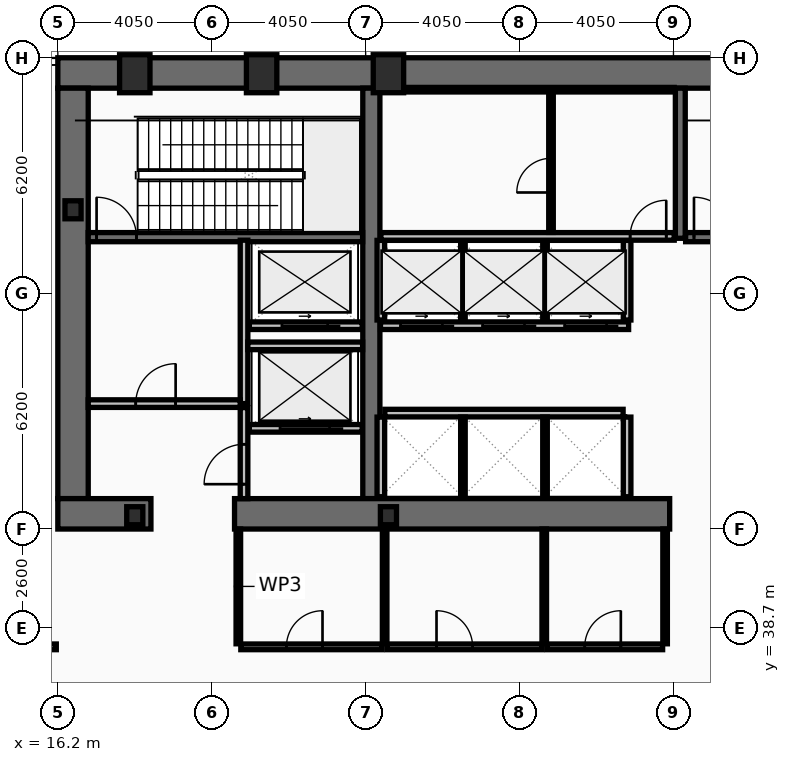
"""IFC4 building model, lengths in metres.
Left out: names, types, materials, properties, quantities, classifications, styles, units other than length and angle.
Written with IfcOpenShell. Run it as: python <this file> out.ifc"""

import sys

from ifc_helpers import new_model, si_unit, direction, frame, frame_2d, origin, origin_2d, place, context, subcontext, project, spatial, rectangle, hollow_rectangle, i_section, extrude, element, fill, save


model = new_model("IFC4")
c1 = context("Model", 3, precision=1e-05, world=origin(), true_north=direction((0.0, 1.0)))
c2 = subcontext(c1, "Body", "Model", "MODEL_VIEW")
j1 = project(units=[si_unit("LENGTHUNIT", "METRE"), si_unit("PLANEANGLEUNIT", "RADIAN")], contexts=[c1])
p1 = place(None, origin())
s1 = spatial("IfcSite", under=j1, at=p1, CompositionType="ELEMENT")
p2 = place(p1, origin())
s2 = spatial("IfcBuilding", under=s1, at=p2, CompositionType="ELEMENT")
p3 = place(p2, frame((0.0, 0.0, 20.4)))
s3 = spatial("IfcBuildingStorey", under=s2, at=p3, CompositionType="ELEMENT", Elevation=20.4)
p4 = place(p3, frame((16.2, 53.3, 0.0), z_axis=(0.0, 0.0, 1.0), x_axis=(1.0, 0.0, 0.0)))
e1 = element("IfcWall", 1, at=p4, inside=s3, PredefinedType="SHEAR", context=c2, shape_type="SweptSolid", body=[
    extrude(rectangle(XDim=40.5, YDim=0.8, at=frame_2d((20.25, 0.0))), origin(), (0.0, 0.0, 1.0), 5.22),
])
p5 = place(p3, frame((16.6, 42.1, 0.0), z_axis=(0.0, 0.0, 1.0), x_axis=(0.0, 1.0, 0.0)))
e2 = element("IfcWall", 2, at=p5, inside=s3, PredefinedType="SHEAR", context=c2, shape_type="SweptSolid", body=[
    extrude(rectangle(XDim=10.8, YDim=0.8, at=frame_2d((5.4, 0.0))), origin(), (0.0, 0.0, 1.0), 5.22),
])
p6 = place(p3, frame((24.45, 42.1, 0.0), z_axis=(0.0, 0.0, 1.0), x_axis=(0.0, 1.0, 0.0)))
e3 = element("IfcWall", 3, at=p6, inside=s3, PredefinedType="SHEAR", context=c2, shape_type="SweptSolid", body=[
    extrude(rectangle(XDim=10.8, YDim=0.45, at=frame_2d((5.4, 0.0))), origin(), (0.0, 0.0, 1.0), 5.22),
])
p7 = place(p3, frame((18.65, 41.7, 0.0), z_axis=(0.0, 0.0, 1.0), x_axis=(-1.0, 0.0, 0.0)))
e4 = element("IfcWall", 4, at=p7, inside=s3, PredefinedType="SHEAR", context=c2, shape_type="SweptSolid", body=[
    extrude(rectangle(XDim=2.45, YDim=0.8, at=frame_2d((1.225, 0.0))), origin(), (0.0, 0.0, 1.0), 5.22),
])
p8 = place(p3, frame((32.3, 41.7, 0.0), z_axis=(0.0, 0.0, 1.0), x_axis=(-1.0, 0.0, 0.0)))
e5 = element("IfcWall", 5, at=p8, inside=s3, PredefinedType="SHEAR", context=c2, shape_type="SweptSolid", body=[
    extrude(rectangle(XDim=11.45, YDim=0.8, at=frame_2d((5.725, 0.0))), origin(), (0.0, 0.0, 1.0), 5.22),
])
p9 = place(p3, frame((32.58, 48.95, 0.0), z_axis=(0.0, 0.0, 1.0), x_axis=(0.0, 1.0, 0.0)))
e6 = element("IfcWall", 6, at=p9, inside=s3, PredefinedType="SHEAR", context=c2, shape_type="SweptSolid", body=[
    extrude(rectangle(XDim=3.95, YDim=0.26, at=frame_2d((1.975, 0.0))), origin(), (0.0, 0.0, 1.0), 5.22),
])
p10 = place(p3, frame((17.0, 48.98, 0.0), z_axis=(0.0, 0.0, 1.0), x_axis=(1.0, 0.0, 0.0)))
e7 = element("IfcWall", 7, at=p10, inside=s3, PredefinedType="SHEAR", context=c2, shape_type="SweptSolid", body=[
    extrude(rectangle(XDim=7.22, YDim=0.24, at=frame_2d((3.61, 0.0))), origin(), (0.0, 0.0, 1.0), 5.22),
])
p11 = place(p10, frame((0.22, 0.0, 0.0)))
e8 = element("IfcOpeningElement", 8, at=p11, cuts=e7, PredefinedType="OPENING", context=c2, shape_type="SweptSolid", body=[
    extrude(rectangle(XDim=1.05, YDim=2.15, at=frame_2d((0.525, 1.075))), frame((0.0, 0.13, 0.0), z_axis=(0.0, -1.0, 0.0), x_axis=(1.0, 0.0, 0.0)), (0.0, 0.0, 1.0), 0.26),
])
p12 = place(p3, frame((32.72, 48.98, 0.0), z_axis=(0.0, 0.0, 1.0), x_axis=(1.0, 0.0, 0.0)))
e9 = element("IfcWall", 9, at=p12, inside=s3, PredefinedType="SHEAR", context=c2, shape_type="SweptSolid", body=[
    extrude(rectangle(XDim=7.56, YDim=0.24, at=frame_2d((3.78, 0.0))), origin(), (0.0, 0.0, 1.0), 5.22),
])
p13 = place(p12, frame((0.22, 0.0, 0.0)))
e10 = element("IfcOpeningElement", 10, at=p13, cuts=e9, PredefinedType="OPENING", context=c2, shape_type="SweptSolid", body=[
    extrude(rectangle(XDim=1.05, YDim=2.15, at=frame_2d((0.525, 1.075))), frame((0.0, 0.13, 0.0), z_axis=(0.0, -1.0, 0.0), x_axis=(1.0, 0.0, 0.0)), (0.0, 0.0, 1.0), 0.26),
])
for number, where, z_axis, x_axis in (
    (11, (18.225, 53.28, 0.0), (0.0, 0.0, 1.0), (1.0, 0.0, 0.0)),
    (12, (21.562, 53.28, 0.0), (0.0, 0.0, 1.0), (1.0, 0.0, 0.0)),
    (13, (24.9, 53.28, 0.0), (0.0, 0.0, 1.0), (1.0, 0.0, 0.0)),
):
    element("IfcColumn", number, at=place(p3, frame(where, z_axis=z_axis, x_axis=x_axis)), inside=s3, PredefinedType="COLUMN", context=c2, shape_type="SweptSolid", body=[
        extrude(hollow_rectangle(XDim=0.8, YDim=1.0, WallThickness=0.055, at=origin_2d()), origin(), (0.0, 0.0, 1.0), 5.4),
    ])
for number, where, z_axis, x_axis in (
    (14, (16.6, 49.7, 0.0), (0.0, 0.0, 1.0), (1.0, 0.0, 0.0)),
    (15, (18.225, 41.65, 0.0), (0.0, 0.0, 1.0), (1.0, 0.0, 0.0)),
    (16, (24.9, 41.65, 0.0), (0.0, 0.0, 1.0), (1.0, 0.0, 0.0)),
):
    element("IfcColumn", number, at=place(p3, frame(where, z_axis=z_axis, x_axis=x_axis)), inside=s3, PredefinedType="COLUMN", context=c2, shape_type="SweptSolid", body=[
        extrude(i_section(OverallWidth=0.424, OverallDepth=0.474, WebThickness=0.048, FlangeThickness=0.077, at=origin_2d()), origin(), (0.0, 0.0, 1.0), 5.4),
    ])
p14 = place(p3, frame((24.21, 43.95, 0.0), z_axis=(0.0, 0.0, 1.0), x_axis=(-1.0, 0.0, 0.0)))
e17 = element("IfcWall", 17, at=p14, inside=s3, PredefinedType="PARTITIONING", context=c2, shape_type="SweptSolid", body=[
    extrude(rectangle(XDim=2.97, YDim=0.2, at=frame_2d((1.485, 0.0))), origin(), (0.0, 0.0, 1.0), 5.22),
])
p15 = place(p14, frame((0.86, 0.0, 0.0)))
e18 = element("IfcOpeningElement", 18, at=p15, cuts=e17, PredefinedType="OPENING", context=c2, shape_type="SweptSolid", body=[
    extrude(rectangle(XDim=1.3, YDim=2.18, at=frame_2d((0.65, 1.09))), frame((0.0, 0.11, 0.0), z_axis=(0.0, -1.0, 0.0), x_axis=(1.0, 0.0, 0.0)), (0.0, 0.0, 1.0), 0.22),
])
p16 = place(p3, frame((24.21, 46.65, 0.0), z_axis=(0.0, 0.0, 1.0), x_axis=(-1.0, 0.0, 0.0)))
e19 = element("IfcWall", 19, at=p16, inside=s3, PredefinedType="PARTITIONING", context=c2, shape_type="SweptSolid", body=[
    extrude(rectangle(XDim=2.97, YDim=0.2, at=frame_2d((1.485, 0.0))), origin(), (0.0, 0.0, 1.0), 5.22),
])
p17 = place(p16, frame((0.91, 0.0, 0.0)))
e20 = element("IfcOpeningElement", 20, at=p17, cuts=e19, PredefinedType="OPENING", context=c2, shape_type="SweptSolid", body=[
    extrude(rectangle(XDim=1.2, YDim=2.18, at=frame_2d((0.6, 1.09))), frame((0.0, 0.11, 0.0), z_axis=(0.0, -1.0, 0.0), x_axis=(1.0, 0.0, 0.0)), (0.0, 0.0, 1.0), 0.22),
])
p18 = place(p3, frame((31.22, 46.65, 0.0), z_axis=(0.0, 0.0, 1.0), x_axis=(-1.0, 0.0, 0.0)))
e21 = element("IfcWall", 21, at=p18, inside=s3, PredefinedType="PARTITIONING", context=c2, shape_type="SweptSolid", body=[
    extrude(rectangle(XDim=6.53, YDim=0.2, at=frame_2d((3.265, 0.0))), origin(), (0.0, 0.0, 1.0), 5.22),
])
p19 = place(p18, frame((4.9, 0.0, 0.0)))
e22 = element("IfcOpeningElement", 22, at=p19, cuts=e21, PredefinedType="OPENING", context=c2, shape_type="SweptSolid", body=[
    extrude(rectangle(XDim=1.1, YDim=2.18, at=frame_2d((0.55, 1.09))), frame((0.0, 0.11, 0.0), z_axis=(0.0, -1.0, 0.0), x_axis=(1.0, 0.0, 0.0)), (0.0, 0.0, 1.0), 0.22),
])
p20 = place(p18, frame((2.74, 0.0, 0.0)))
e23 = element("IfcOpeningElement", 23, at=p20, cuts=e21, PredefinedType="OPENING", context=c2, shape_type="SweptSolid", body=[
    extrude(rectangle(XDim=1.1, YDim=2.18, at=frame_2d((0.55, 1.09))), frame((0.0, 0.11, 0.0), z_axis=(0.0, -1.0, 0.0), x_axis=(1.0, 0.0, 0.0)), (0.0, 0.0, 1.0), 0.22),
])
p21 = place(p18, frame((0.58, 0.0, 0.0)))
e24 = element("IfcOpeningElement", 24, at=p21, cuts=e21, PredefinedType="OPENING", context=c2, shape_type="SweptSolid", body=[
    extrude(rectangle(XDim=1.1, YDim=2.18, at=frame_2d((0.55, 1.09))), frame((0.0, 0.11, 0.0), z_axis=(0.0, -1.0, 0.0), x_axis=(1.0, 0.0, 0.0)), (0.0, 0.0, 1.0), 0.22),
])
p22 = place(p3, frame((21.1, 44.6, 0.0), z_axis=(0.0, 0.0, 1.0), x_axis=(0.0, 1.0, 0.0)))
e25 = element("IfcWall", 25, at=p22, inside=s3, PredefinedType="PARTITIONING", context=c2, shape_type="SweptSolid", body=[
    extrude(rectangle(XDim=4.3, YDim=0.2, at=frame_2d((2.15, 0.0))), origin(), (0.0, 0.0, 1.0), 5.22),
])
p23 = place(p3, frame((17.0, 44.6, 0.0), z_axis=(0.0, 0.0, 1.0), x_axis=(1.0, 0.0, 0.0)))
e26 = element("IfcWall", 26, at=p23, inside=s3, PredefinedType="PARTITIONING", context=c2, shape_type="SweptSolid", body=[
    extrude(rectangle(XDim=4.0, YDim=0.2, at=frame_2d((2.0, 0.0))), origin(), (0.0, 0.0, 1.0), 5.22),
])
p24 = place(p23, frame((1.25, 0.0, 0.0)))
e27 = element("IfcOpeningElement", 27, at=p24, cuts=e26, PredefinedType="OPENING", context=c2, shape_type="SweptSolid", body=[
    extrude(rectangle(XDim=1.05, YDim=2.15, at=frame_2d((0.525, 1.075))), frame((0.0, 0.11, 0.0), z_axis=(0.0, -1.0, 0.0), x_axis=(1.0, 0.0, 0.0)), (0.0, 0.0, 1.0), 0.22),
])
p25 = place(p3, frame((21.2, 46.12, 0.0), z_axis=(0.0, 0.0, 1.0), x_axis=(1.0, 0.0, 0.0)))
e28 = element("IfcWall", 28, at=p25, inside=s3, PredefinedType="PARTITIONING", context=c2, shape_type="SweptSolid", body=[
    extrude(rectangle(XDim=3.02, YDim=0.2, at=frame_2d((1.51, 0.0))), origin(), (0.0, 0.0, 1.0), 5.22),
])
p26 = place(p3, frame((21.1, 42.1, 0.0), z_axis=(0.0, 0.0, 1.0), x_axis=(0.0, 1.0, 0.0)))
e29 = element("IfcWall", 29, at=p26, inside=s3, PredefinedType="PARTITIONING", context=c2, shape_type="SweptSolid", body=[
    extrude(rectangle(XDim=2.395, YDim=0.2, at=frame_2d((1.198, 0.0))), origin(), (0.0, 0.0, 1.0), 5.22),
])
p27 = place(p26, frame((0.38, 0.0, 0.0)))
e30 = element("IfcOpeningElement", 30, at=p27, cuts=e29, PredefinedType="OPENING", context=c2, shape_type="SweptSolid", body=[
    extrude(rectangle(XDim=1.05, YDim=2.15, at=frame_2d((0.525, 1.075))), frame((0.0, 0.11, 0.0), z_axis=(0.0, -1.0, 0.0), x_axis=(1.0, 0.0, 0.0)), (0.0, 0.0, 1.0), 0.22),
])
for number, where, z_axis, x_axis in (
    (31, (24.7, 46.8, 0.0), (0.0, 0.0, 1.0), (0.0, 1.0, 0.0)),
    (32, (31.18, 46.8, 0.0), (0.0, 0.0, 1.0), (0.0, 1.0, 0.0)),
):
    element("IfcWall", number, at=place(p3, frame(where, z_axis=z_axis, x_axis=x_axis)), inside=s3, PredefinedType="PARTITIONING", context=c2, shape_type="SweptSolid", body=[
        extrude(rectangle(XDim=2.095, YDim=0.2, at=frame_2d((1.047, 0.0))), origin(), (0.0, 0.0, 1.0), 5.22),
    ])
for number, where, z_axis, x_axis in (
    (33, (26.86, 46.8, 0.0), (0.0, 0.0, 1.0), (0.0, 1.0, 0.0)),
    (34, (29.02, 46.8, 0.0), (0.0, 0.0, 1.0), (0.0, 1.0, 0.0)),
):
    element("IfcWall", number, at=place(p3, frame(where, z_axis=z_axis, x_axis=x_axis)), inside=s3, PredefinedType="PARTITIONING", context=c2, shape_type="SweptSolid", body=[
        extrude(rectangle(XDim=2.095, YDim=0.12, at=frame_2d((1.047, 0.0))), origin(), (0.0, 0.0, 1.0), 5.22),
    ])
p28 = place(p3, frame((24.805, 44.35, 0.0), z_axis=(0.0, 0.0, 1.0), x_axis=(1.0, 0.0, 0.0)))
e35 = element("IfcWall", 35, at=p28, inside=s3, PredefinedType="PARTITIONING", context=c2, shape_type="SweptSolid", body=[
    extrude(rectangle(XDim=6.27, YDim=0.2, at=frame_2d((3.135, 0.0))), origin(), (0.0, 0.0, 1.0), 5.22),
])
for number, where, z_axis, x_axis in (
    (36, (24.7, 42.15, 0.0), (0.0, 0.0, 1.0), (0.0, 1.0, 0.0)),
    (37, (31.18, 42.15, 0.0), (0.0, 0.0, 1.0), (0.0, 1.0, 0.0)),
):
    element("IfcWall", number, at=place(p3, frame(where, z_axis=z_axis, x_axis=x_axis)), inside=s3, PredefinedType="PARTITIONING", context=c2, shape_type="SweptSolid", body=[
        extrude(rectangle(XDim=2.095, YDim=0.2, at=frame_2d((1.048, 0.0))), origin(), (0.0, 0.0, 1.0), 5.22),
    ])
for number, where, z_axis, x_axis in (
    (38, (26.86, 42.15, 0.0), (0.0, 0.0, 1.0), (0.0, 1.0, 0.0)),
    (39, (29.02, 42.15, 0.0), (0.0, 0.0, 1.0), (0.0, 1.0, 0.0)),
):
    element("IfcWall", number, at=place(p3, frame(where, z_axis=z_axis, x_axis=x_axis)), inside=s3, PredefinedType="PARTITIONING", context=c2, shape_type="SweptSolid", body=[
        extrude(rectangle(XDim=2.095, YDim=0.12, at=frame_2d((1.048, 0.0))), origin(), (0.0, 0.0, 1.0), 5.22),
    ])
p29 = place(p3, frame((24.7, 52.86, 0.0), z_axis=(0.0, 0.0, 1.0), x_axis=(1.0, 0.0, 0.0)))
e40 = element("IfcWall", 40, at=p29, inside=s3, PredefinedType="PARTITIONING", context=c2, shape_type="SweptSolid", body=[
    extrude(rectangle(XDim=7.72, YDim=0.12, at=frame_2d((3.86, 0.0))), origin(), (0.0, 0.0, 1.0), 5.22),
])
p30 = place(p3, frame((24.7, 49.0, 0.0), z_axis=(0.0, 0.0, 1.0), x_axis=(1.0, 0.0, 0.0)))
e41 = element("IfcWall", 41, at=p30, inside=s3, PredefinedType="PARTITIONING", context=c2, shape_type="SweptSolid", body=[
    extrude(rectangle(XDim=7.72, YDim=0.2, at=frame_2d((3.86, 0.0))), origin(), (0.0, 0.0, 1.0), 5.22),
])
p31 = place(p30, frame((6.56, 0.0, 0.0)))
e42 = element("IfcOpeningElement", 42, at=p31, cuts=e41, PredefinedType="OPENING", context=c2, shape_type="SweptSolid", body=[
    extrude(rectangle(XDim=0.95, YDim=2.1, at=frame_2d((0.475, 1.05))), frame((0.0, 0.11, 0.0), z_axis=(0.0, -1.0, 0.0), x_axis=(1.0, 0.0, 0.0)), (0.0, 0.0, 1.0), 0.22),
])
p32 = place(p3, frame((29.177, 49.105, 0.0), z_axis=(0.0, 0.0, 1.0), x_axis=(0.0, 1.0, 0.0)))
e43 = element("IfcWall", 43, at=p32, inside=s3, PredefinedType="PARTITIONING", context=c2, shape_type="SweptSolid", body=[
    extrude(rectangle(XDim=3.69, YDim=0.12, at=frame_2d((1.845, 0.0))), origin(), (0.0, 0.0, 1.0), 5.22),
])
p33 = place(p32, frame((1.05, 0.0, 0.0)))
e44 = element("IfcOpeningElement", 44, at=p33, cuts=e43, PredefinedType="OPENING", context=c2, shape_type="SweptSolid", body=[
    extrude(rectangle(XDim=0.9, YDim=2.05, at=frame_2d((0.45, 1.025))), frame((0.0, 0.07, 0.0), z_axis=(0.0, -1.0, 0.0), x_axis=(1.0, 0.0, 0.0)), (0.0, 0.0, 1.0), 0.14),
])
p34 = place(p3, frame((21.015, 38.2, 0.0), z_axis=(0.0, 0.0, 1.0), x_axis=(1.0, 0.0, 0.0)))
e45 = element("IfcWall", 45, at=p34, inside=s3, PredefinedType="PARTITIONING", context=c2, shape_type="SweptSolid", body=[
    extrude(rectangle(XDim=3.72, YDim=0.15, at=frame_2d((1.86, 0.0))), origin(), (0.0, 0.0, 1.0), 4.41),
])
p35 = place(p34, frame((1.2, 0.0, 0.0)))
e46 = element("IfcOpeningElement", 46, at=p35, cuts=e45, PredefinedType="OPENING", context=c2, shape_type="SweptSolid", body=[
    extrude(rectangle(XDim=0.95, YDim=2.05, at=frame_2d((0.475, 1.025))), frame((0.0, 0.085, 0.0), z_axis=(0.0, -1.0, 0.0), x_axis=(1.0, 0.0, 0.0)), (0.0, 0.0, 1.0), 0.17),
])
p36 = place(p3, frame((24.865, 38.2, 0.0), z_axis=(0.0, 0.0, 1.0), x_axis=(1.0, 0.0, 0.0)))
e47 = element("IfcWall", 47, at=p36, inside=s3, PredefinedType="PARTITIONING", context=c2, shape_type="SweptSolid", body=[
    extrude(rectangle(XDim=4.07, YDim=0.15, at=frame_2d((2.035, 0.0))), origin(), (0.0, 0.0, 1.0), 4.41),
])
p37 = place(p36, frame((1.3, 0.0, 0.0)))
e48 = element("IfcOpeningElement", 48, at=p37, cuts=e47, PredefinedType="OPENING", context=c2, shape_type="SweptSolid", body=[
    extrude(rectangle(XDim=0.95, YDim=2.05, at=frame_2d((0.475, 1.025))), frame((0.0, 0.085, 0.0), z_axis=(0.0, -1.0, 0.0), x_axis=(1.0, 0.0, 0.0)), (0.0, 0.0, 1.0), 0.17),
])
p38 = place(p3, frame((29.065, 38.2, 0.0), z_axis=(0.0, 0.0, 1.0), x_axis=(1.0, 0.0, 0.0)))
e49 = element("IfcWall", 49, at=p38, inside=s3, PredefinedType="PARTITIONING", context=c2, shape_type="SweptSolid", body=[
    extrude(rectangle(XDim=3.05, YDim=0.15, at=frame_2d((1.525, 0.0))), origin(), (0.0, 0.0, 1.0), 4.41),
])
p39 = place(p38, frame((1.0, 0.0, 0.0)))
e50 = element("IfcOpeningElement", 50, at=p39, cuts=e49, PredefinedType="OPENING", context=c2, shape_type="SweptSolid", body=[
    extrude(rectangle(XDim=0.95, YDim=2.05, at=frame_2d((0.475, 1.025))), frame((0.0, 0.085, 0.0), z_axis=(0.0, -1.0, 0.0), x_axis=(1.0, 0.0, 0.0)), (0.0, 0.0, 1.0), 0.17),
])
p40 = place(p3, frame((20.95, 38.28, 0.0), z_axis=(0.0, 0.0, 1.0), x_axis=(0.0, 1.0, 0.0)))
e51 = element("IfcWall", 51, at=p40, inside=s3, PredefinedType="PARTITIONING", context=c2, shape_type="SweptSolid", body=[
    extrude(rectangle(XDim=3.02, YDim=0.12, at=frame_2d((1.51, 0.0))), origin(), (0.0, 0.0, 1.0), 5.22),
])
p41 = place(p3, frame((24.8, 38.28, 0.0), z_axis=(0.0, 0.0, 1.0), x_axis=(0.0, 1.0, 0.0)))
e52 = element("IfcWall", 52, at=p41, inside=s3, PredefinedType="PARTITIONING", context=c2, shape_type="SweptSolid", body=[
    extrude(rectangle(XDim=3.02, YDim=0.12, at=frame_2d((1.51, 0.0))), origin(), (0.0, 0.0, 1.0), 4.41),
])
for number, where, z_axis, x_axis in (
    (53, (29.0, 38.28, 0.0), (0.0, 0.0, 1.0), (0.0, 1.0, 0.0)),
    (54, (32.18, 38.28, 0.0), (0.0, 0.0, 1.0), (0.0, 1.0, 0.0)),
):
    element("IfcWall", number, at=place(p3, frame(where, z_axis=z_axis, x_axis=x_axis)), inside=s3, PredefinedType="PARTITIONING", context=c2, shape_type="SweptSolid", body=[
        extrude(rectangle(XDim=3.02, YDim=0.12, at=frame_2d((1.51, 0.0))), origin(), (0.0, 0.0, 1.0), 5.22),
    ])
p42 = place(p3, frame((0.18, 38.2, 0.0), z_axis=(0.0, 0.0, 1.0), x_axis=(1.0, 0.0, 0.0)))
e55 = element("IfcWall", 55, at=p42, inside=s3, PredefinedType="PARTITIONING", context=c2, shape_type="SweptSolid", body=[
    extrude(rectangle(XDim=15.98, YDim=0.15, at=frame_2d((7.99, 0.0))), origin(), (0.0, 0.0, 1.0), 4.56),
])
p43 = place(p42, frame((4.2, 0.0, 0.0)))
e56 = element("IfcOpeningElement", 56, at=p43, cuts=e55, PredefinedType="OPENING", context=c2, shape_type="SweptSolid", body=[
    extrude(rectangle(XDim=0.95, YDim=2.1, at=frame_2d((0.475, 1.05))), frame((0.0, 0.085, 0.0), z_axis=(0.0, -1.0, 0.0), x_axis=(1.0, 0.0, 0.0)), (0.0, 0.0, 1.0), 0.17),
])
p44 = place(p11, origin())
e57 = element("IfcDoor", 57, at=p44, inside=s3, OperationType="SINGLE_SWING_LEFT", PredefinedType="DOOR", context=c2, shape_type="SweptSolid", body=[
    extrude(rectangle(XDim=1.05, YDim=2.15, at=frame_2d((0.525, 1.075))), frame((0.0, 0.025, 0.0), z_axis=(0.0, -1.0, 0.0), x_axis=(1.0, 0.0, 0.0)), (0.0, 0.0, 1.0), 0.05),
])
fill(e8, e57)
p45 = place(p13, origin())
e58 = element("IfcDoor", 58, at=p45, inside=s3, OperationType="SINGLE_SWING_LEFT", PredefinedType="DOOR", context=c2, shape_type="SweptSolid", body=[
    extrude(rectangle(XDim=1.05, YDim=2.15, at=frame_2d((0.525, 1.075))), frame((0.0, 0.025, 0.0), z_axis=(0.0, -1.0, 0.0), x_axis=(1.0, 0.0, 0.0)), (0.0, 0.0, 1.0), 0.05),
])
fill(e10, e58)
p46 = place(p15, origin())
e59 = element("IfcDoor", 59, at=p46, inside=s3, OperationType="SLIDING_TO_LEFT", PredefinedType="DOOR", context=c2, shape_type="SweptSolid", body=[
    extrude(rectangle(XDim=1.3, YDim=2.18, at=frame_2d((0.65, 1.09))), frame((0.0, 0.025, 0.0), z_axis=(0.0, -1.0, 0.0), x_axis=(1.0, 0.0, 0.0)), (0.0, 0.0, 1.0), 0.05),
])
fill(e18, e59)
p47 = place(p17, origin())
e60 = element("IfcDoor", 60, at=p47, inside=s3, OperationType="SLIDING_TO_LEFT", PredefinedType="DOOR", context=c2, shape_type="SweptSolid", body=[
    extrude(rectangle(XDim=1.2, YDim=2.18, at=frame_2d((0.6, 1.09))), frame((0.0, 0.025, 0.0), z_axis=(0.0, -1.0, 0.0), x_axis=(1.0, 0.0, 0.0)), (0.0, 0.0, 1.0), 0.05),
])
fill(e20, e60)
p48 = place(p19, origin())
e61 = element("IfcDoor", 61, at=p48, inside=s3, OperationType="SLIDING_TO_LEFT", PredefinedType="DOOR", context=c2, shape_type="SweptSolid", body=[
    extrude(rectangle(XDim=1.1, YDim=2.18, at=frame_2d((0.55, 1.09))), frame((0.0, 0.025, 0.0), z_axis=(0.0, -1.0, 0.0), x_axis=(1.0, 0.0, 0.0)), (0.0, 0.0, 1.0), 0.05),
])
fill(e22, e61)
p49 = place(p20, origin())
e62 = element("IfcDoor", 62, at=p49, inside=s3, OperationType="SLIDING_TO_LEFT", PredefinedType="DOOR", context=c2, shape_type="SweptSolid", body=[
    extrude(rectangle(XDim=1.1, YDim=2.18, at=frame_2d((0.55, 1.09))), frame((0.0, 0.025, 0.0), z_axis=(0.0, -1.0, 0.0), x_axis=(1.0, 0.0, 0.0)), (0.0, 0.0, 1.0), 0.05),
])
fill(e23, e62)
p50 = place(p21, origin())
e63 = element("IfcDoor", 63, at=p50, inside=s3, OperationType="SLIDING_TO_LEFT", PredefinedType="DOOR", context=c2, shape_type="SweptSolid", body=[
    extrude(rectangle(XDim=1.1, YDim=2.18, at=frame_2d((0.55, 1.09))), frame((0.0, 0.025, 0.0), z_axis=(0.0, -1.0, 0.0), x_axis=(1.0, 0.0, 0.0)), (0.0, 0.0, 1.0), 0.05),
])
fill(e24, e63)
p51 = place(p24, origin())
e64 = element("IfcDoor", 64, at=p51, inside=s3, OperationType="SINGLE_SWING_RIGHT", PredefinedType="DOOR", context=c2, shape_type="SweptSolid", body=[
    extrude(rectangle(XDim=1.05, YDim=2.15, at=frame_2d((0.525, 1.075))), frame((0.0, 0.025, 0.0), z_axis=(0.0, -1.0, 0.0), x_axis=(1.0, 0.0, 0.0)), (0.0, 0.0, 1.0), 0.05),
])
fill(e27, e64)
p52 = place(p27, origin())
e65 = element("IfcDoor", 65, at=p52, inside=s3, OperationType="SINGLE_SWING_LEFT", PredefinedType="DOOR", context=c2, shape_type="SweptSolid", body=[
    extrude(rectangle(XDim=1.05, YDim=2.15, at=frame_2d((0.525, 1.075))), frame((0.0, 0.025, 0.0), z_axis=(0.0, -1.0, 0.0), x_axis=(1.0, 0.0, 0.0)), (0.0, 0.0, 1.0), 0.05),
])
fill(e30, e65)
p53 = place(p31, origin())
e66 = element("IfcDoor", 66, at=p53, inside=s3, OperationType="SINGLE_SWING_RIGHT", PredefinedType="DOOR", context=c2, shape_type="SweptSolid", body=[
    extrude(rectangle(XDim=0.95, YDim=2.1, at=frame_2d((0.475, 1.05))), frame((0.0, 0.025, 0.0), z_axis=(0.0, -1.0, 0.0), x_axis=(1.0, 0.0, 0.0)), (0.0, 0.0, 1.0), 0.05),
])
fill(e42, e66)
p54 = place(p33, origin())
e67 = element("IfcDoor", 67, at=p54, inside=s3, OperationType="SINGLE_SWING_LEFT", PredefinedType="DOOR", context=c2, shape_type="SweptSolid", body=[
    extrude(rectangle(XDim=0.9, YDim=2.05, at=frame_2d((0.45, 1.025))), frame((0.0, 0.025, 0.0), z_axis=(0.0, -1.0, 0.0), x_axis=(1.0, 0.0, 0.0)), (0.0, 0.0, 1.0), 0.05),
])
fill(e44, e67)
p55 = place(p35, origin())
e68 = element("IfcDoor", 68, at=p55, inside=s3, OperationType="SINGLE_SWING_RIGHT", PredefinedType="DOOR", context=c2, shape_type="SweptSolid", body=[
    extrude(rectangle(XDim=0.95, YDim=2.05, at=frame_2d((0.475, 1.025))), frame((0.0, 0.025, 0.0), z_axis=(0.0, -1.0, 0.0), x_axis=(1.0, 0.0, 0.0)), (0.0, 0.0, 1.0), 0.05),
])
fill(e46, e68)
p56 = place(p37, origin())
e69 = element("IfcDoor", 69, at=p56, inside=s3, OperationType="SINGLE_SWING_LEFT", PredefinedType="DOOR", context=c2, shape_type="SweptSolid", body=[
    extrude(rectangle(XDim=0.95, YDim=2.05, at=frame_2d((0.475, 1.025))), frame((0.0, 0.025, 0.0), z_axis=(0.0, -1.0, 0.0), x_axis=(1.0, 0.0, 0.0)), (0.0, 0.0, 1.0), 0.05),
])
fill(e48, e69)
p57 = place(p39, origin())
e70 = element("IfcDoor", 70, at=p57, inside=s3, OperationType="SINGLE_SWING_RIGHT", PredefinedType="DOOR", context=c2, shape_type="SweptSolid", body=[
    extrude(rectangle(XDim=0.95, YDim=2.05, at=frame_2d((0.475, 1.025))), frame((0.0, 0.025, 0.0), z_axis=(0.0, -1.0, 0.0), x_axis=(1.0, 0.0, 0.0)), (0.0, 0.0, 1.0), 0.05),
])
fill(e50, e70)
save(model, sys.argv[1])
